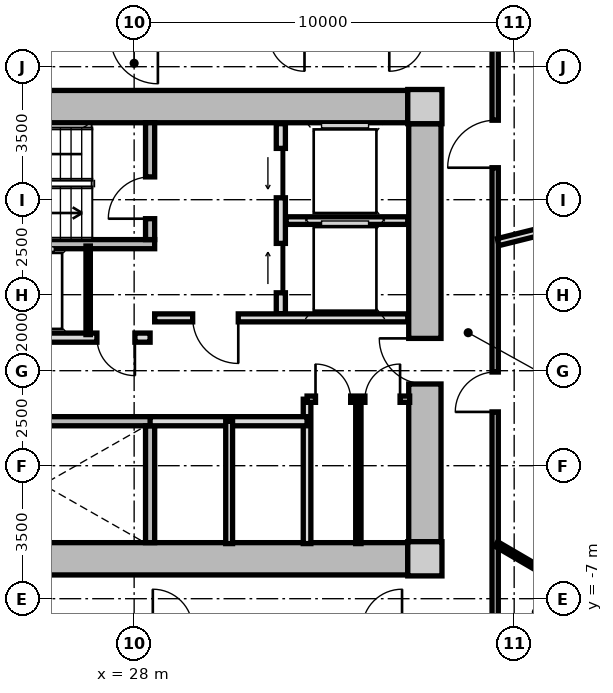
"""IFC4 building model, lengths in metres.
Left out: names, types, materials, properties, quantities, classifications, styles, units other than length and angle.
Written with IfcOpenShell. Run it as: python <this file> out.ifc"""

import sys

from ifc_helpers import new_model, si_unit, direction, frame, frame_2d, origin, origin_2d, place, context, subcontext, project, spatial, rectangle, extrude, source, transform, mapped, element, fill, save


model = new_model("IFC4")
c1 = context("Model", 3, precision=1e-05, world=origin(), true_north=direction((0.0, 1.0)))
c2 = subcontext(c1, "Body", "Model", "MODEL_VIEW")
j1 = project(units=[si_unit("LENGTHUNIT", "METRE"), si_unit("PLANEANGLEUNIT", "RADIAN")], contexts=[c1])
p1 = place(None, origin())
s1 = spatial("IfcSite", under=j1, at=p1, CompositionType="ELEMENT")
p2 = place(p1, origin())
s2 = spatial("IfcBuilding", under=s1, at=p2, CompositionType="ELEMENT")
p3 = place(p2, frame((0.0, 0.0, 49.05)))
s3 = spatial("IfcBuildingStorey", under=s2, at=p3, CompositionType="ELEMENT", Elevation=49.05)
m1 = source(origin(), c2, "Body", "SweptSolid", [
    extrude(rectangle(XDim=0.9, YDim=0.9, at=origin_2d()), origin(), (0.0, 0.0, 1.0), 3.05),
])
for number, where, z_axis, x_axis in (
    (1, (35.65, -5.95, 0.0), (0.0, 0.0, 1.0), (1.0, 0.0, 0.0)),
    (2, (35.65, 5.95, 0.0), (0.0, 0.0, 1.0), (1.0, 0.0, 0.0)),
):
    element("IfcColumn", number, at=place(p3, frame(where, z_axis=z_axis, x_axis=x_axis)), inside=s3, PredefinedType="COLUMN", context=c2, shape_type="MappedRepresentation", body=[
        mapped(m1, transform((0.0, 0.0, 0.0), x_axis=(1.0, 0.0, 0.0), y_axis=(0.0, 1.0, 0.0), z_axis=(0.0, 0.0, 1.0), scale=1.0)),
    ])
m2 = source(origin(), c2, "Body", "SweptSolid", [
    extrude(rectangle(XDim=14.4, YDim=0.85, at=frame_2d((7.2, 0.0))), origin(), (0.0, 0.0, 1.0), 2.79),
])
for number, where, z_axis, x_axis in (
    (3, (20.8, 5.95, 0.0), (0.0, 0.0, 1.0), (1.0, 0.0, 0.0)),
    (4, (35.2, -5.95, 0.0), (0.0, 0.0, 1.0), (-1.0, 0.0, 0.0)),
):
    element("IfcWall", number, at=place(p3, frame(where, z_axis=z_axis, x_axis=x_axis)), inside=s3, PredefinedType="SHEAR", context=c2, shape_type="MappedRepresentation", body=[
        mapped(m2, transform((0.0, 0.0, 0.0), x_axis=(1.0, 0.0, 0.0), y_axis=(0.0, 1.0, 0.0), z_axis=(0.0, 0.0, 1.0), scale=1.0)),
    ])
m3 = source(origin(), c2, "Body", "SweptSolid", [
    extrude(rectangle(XDim=11.0, YDim=0.85, at=frame_2d((5.5, 0.0))), origin(), (0.0, 0.0, 1.0), 2.79),
])
p4 = place(p3, frame((35.65, 5.5, 0.0), z_axis=(0.0, 0.0, 1.0), x_axis=(0.0, -1.0, 0.0)))
e5 = element("IfcWall", 5, at=p4, inside=s3, PredefinedType="SHEAR", context=c2, shape_type="MappedRepresentation", body=[
    mapped(m3, transform((0.0, 0.0, 0.0), x_axis=(1.0, 0.0, 0.0), y_axis=(0.0, 1.0, 0.0), z_axis=(0.0, 0.0, 1.0), scale=1.0)),
])
p5 = place(p4, frame((5.65, 0.0, 0.0)))
e6 = element("IfcOpeningElement", 6, at=p5, cuts=e5, PredefinedType="OPENING", context=c2, shape_type="SweptSolid", body=[
    extrude(rectangle(XDim=1.2, YDim=2.15, at=frame_2d((0.6, 1.075))), frame((0.0, 0.435, 0.0), z_axis=(0.0, -1.0, 0.0), x_axis=(1.0, 0.0, 0.0)), (0.0, 0.0, 1.0), 0.87),
])
m4 = source(origin(), c2, "Body", "SweptSolid", [
    extrude(rectangle(XDim=7.765, YDim=0.24, at=frame_2d((3.883, 0.0))), origin(), (0.0, 0.0, 1.0), 2.79),
])
p6 = place(p3, frame((20.775, 2.33, 0.0), z_axis=(0.0, 0.0, 1.0), x_axis=(1.0, 0.0, 0.0)))
e7 = element("IfcWall", 7, at=p6, inside=s3, PredefinedType="PARTITIONING", context=c2, shape_type="MappedRepresentation", body=[
    mapped(m4, transform((0.0, 0.0, 0.0), x_axis=(1.0, 0.0, 0.0), y_axis=(0.0, 1.0, 0.0), z_axis=(0.0, 0.0, 1.0), scale=1.0)),
])
m5 = source(origin(), c2, "Body", "SweptSolid", [
    extrude(rectangle(XDim=3.075, YDim=0.24, at=frame_2d((1.538, 0.0))), origin(), (0.0, 0.0, 1.0), 2.79),
])
p7 = place(p3, frame((28.42, 2.45, 0.0), z_axis=(0.0, 0.0, 1.0), x_axis=(0.0, 1.0, 0.0)))
e8 = element("IfcWall", 8, at=p7, inside=s3, PredefinedType="PARTITIONING", context=c2, shape_type="MappedRepresentation", body=[
    mapped(m5, transform((0.0, 0.0, 0.0), x_axis=(1.0, 0.0, 0.0), y_axis=(0.0, 1.0, 0.0), z_axis=(0.0, 0.0, 1.0), scale=1.0)),
])
p8 = place(p7, frame((0.55, 0.0, 0.0)))
e9 = element("IfcOpeningElement", 9, at=p8, cuts=e8, PredefinedType="OPENING", context=c2, shape_type="SweptSolid", body=[
    extrude(rectangle(XDim=1.1, YDim=2.15, at=frame_2d((0.55, 1.075))), frame((0.0, 0.13, 0.0), z_axis=(0.0, -1.0, 0.0), x_axis=(1.0, 0.0, 0.0)), (0.0, 0.0, 1.0), 0.26),
])
p9 = place(p3, frame((20.775, -2.33, 0.0), z_axis=(0.0, 0.0, 1.0), x_axis=(1.0, 0.0, 0.0)))
e10 = element("IfcWall", 10, at=p9, inside=s3, PredefinedType="PARTITIONING", context=c2, shape_type="MappedRepresentation", body=[
    mapped(m4, transform((0.0, 0.0, 0.0), x_axis=(1.0, 0.0, 0.0), y_axis=(0.0, 1.0, 0.0), z_axis=(0.0, 0.0, 1.0), scale=1.0)),
])
p10 = place(p9, frame((0.885, 0.0, 0.0)))
e11 = element("IfcOpeningElement", 11, at=p10, cuts=e10, PredefinedType="OPENING", context=c2, shape_type="SweptSolid", body=[
    extrude(rectangle(XDim=1.1, YDim=2.15, at=frame_2d((0.55, 1.075))), frame((0.0, 0.13, 0.0), z_axis=(0.0, -1.0, 0.0), x_axis=(1.0, 0.0, 0.0)), (0.0, 0.0, 1.0), 0.26),
])
p11 = place(p3, frame((28.42, -5.525, 0.0), z_axis=(0.0, 0.0, 1.0), x_axis=(0.0, 1.0, 0.0)))
e12 = element("IfcWall", 12, at=p11, inside=s3, PredefinedType="PARTITIONING", context=c2, shape_type="MappedRepresentation", body=[
    mapped(m5, transform((0.0, 0.0, 0.0), x_axis=(1.0, 0.0, 0.0), y_axis=(0.0, 1.0, 0.0), z_axis=(0.0, 0.0, 1.0), scale=1.0)),
])
m6 = source(origin(), c2, "Body", "SweptSolid", [
    extrude(rectangle(XDim=5.0, YDim=0.24, at=frame_2d((2.5, 0.0))), origin(), (0.0, 0.0, 1.0), 2.775),
])
p12 = place(p3, frame((31.86, 0.5, 0.0), z_axis=(0.0, 0.0, 1.0), x_axis=(0.0, 1.0, 0.0)))
e13 = element("IfcWall", 13, at=p12, inside=s3, PredefinedType="PARTITIONING", context=c2, shape_type="MappedRepresentation", body=[
    mapped(m6, transform((0.0, 0.0, 0.0), x_axis=(1.0, 0.0, 0.0), y_axis=(0.0, 1.0, 0.0), z_axis=(0.0, 0.0, 1.0), scale=1.0)),
])
p13 = place(p12, frame((3.05, 0.0, 0.0)))
e14 = element("IfcOpeningElement", 14, at=p13, cuts=e13, PredefinedType="OPENING", context=c2, shape_type="SweptSolid", body=[
    extrude(rectangle(XDim=1.3, YDim=2.2, at=frame_2d((0.65, 1.1))), frame((0.0, 0.13, 0.0), z_axis=(0.0, -1.0, 0.0), x_axis=(1.0, 0.0, 0.0)), (0.0, 0.0, 1.0), 0.26),
])
p14 = place(p12, frame((0.55, 0.0, 0.0)))
e15 = element("IfcOpeningElement", 15, at=p14, cuts=e13, PredefinedType="OPENING", context=c2, shape_type="SweptSolid", body=[
    extrude(rectangle(XDim=1.3, YDim=2.2, at=frame_2d((0.65, 1.1))), frame((0.0, 0.13, 0.0), z_axis=(0.0, -1.0, 0.0), x_axis=(1.0, 0.0, 0.0)), (0.0, 0.0, 1.0), 0.26),
])
m7 = source(origin(), c2, "Body", "SweptSolid", [
    extrude(rectangle(XDim=3.2, YDim=0.2, at=frame_2d((1.6, 0.0))), origin(), (0.0, 0.0, 1.0), 2.775),
])
p15 = place(p3, frame((32.0, 2.95, 0.0), z_axis=(0.0, 0.0, 1.0), x_axis=(1.0, 0.0, 0.0)))
e16 = element("IfcWall", 16, at=p15, inside=s3, PredefinedType="PARTITIONING", context=c2, shape_type="MappedRepresentation", body=[
    mapped(m7, transform((0.0, 0.0, 0.0), x_axis=(1.0, 0.0, 0.0), y_axis=(0.0, 1.0, 0.0), z_axis=(0.0, 0.0, 1.0), scale=1.0)),
])
m8 = source(origin(), c2, "Body", "SweptSolid", [
    extrude(rectangle(XDim=6.66, YDim=0.21, at=frame_2d((3.33, 0.0))), origin(), (0.0, 0.0, 1.0), 2.775),
])
p16 = place(p3, frame((28.54, 0.39, 0.0), z_axis=(0.0, 0.0, 1.0), x_axis=(1.0, 0.0, 0.0)))
e17 = element("IfcWall", 17, at=p16, inside=s3, PredefinedType="PARTITIONING", context=c2, shape_type="MappedRepresentation", body=[
    mapped(m8, transform((0.0, 0.0, 0.0), x_axis=(1.0, 0.0, 0.0), y_axis=(0.0, 1.0, 0.0), z_axis=(0.0, 0.0, 1.0), scale=1.0)),
])
p17 = place(p16, frame((1.0, 0.0, 0.0)))
e18 = element("IfcOpeningElement", 18, at=p17, cuts=e17, PredefinedType="OPENING", context=c2, shape_type="SweptSolid", body=[
    extrude(rectangle(XDim=1.2, YDim=2.15, at=frame_2d((0.6, 1.075))), frame((0.0, 0.115, 0.0), z_axis=(0.0, -1.0, 0.0), x_axis=(1.0, 0.0, 0.0)), (0.0, 0.0, 1.0), 0.23),
])
m9 = source(origin(), c2, "Body", "SweptSolid", [
    extrude(rectangle(XDim=7.62, YDim=0.24, at=frame_2d((3.81, 0.0))), origin(), (0.0, 0.0, 1.0), 2.775),
])
p18 = place(p3, frame((20.8, -0.13, 0.0), z_axis=(0.0, 0.0, 1.0), x_axis=(1.0, 0.0, 0.0)))
e19 = element("IfcWall", 19, at=p18, inside=s3, PredefinedType="PARTITIONING", context=c2, shape_type="MappedRepresentation", body=[
    mapped(m9, transform((0.0, 0.0, 0.0), x_axis=(1.0, 0.0, 0.0), y_axis=(0.0, 1.0, 0.0), z_axis=(0.0, 0.0, 1.0), scale=1.0)),
])
p19 = place(p18, frame((6.22, 0.0, 0.0)))
e20 = element("IfcOpeningElement", 20, at=p19, cuts=e19, PredefinedType="OPENING", context=c2, shape_type="SweptSolid", body=[
    extrude(rectangle(XDim=1.0, YDim=2.1, at=frame_2d((0.5, 1.05))), frame((0.0, 0.13, 0.0), z_axis=(0.0, -1.0, 0.0), x_axis=(1.0, 0.0, 0.0)), (0.0, 0.0, 1.0), 0.26),
])
p20 = place(p18, frame((0.85, 0.0, 0.0)))
e21 = element("IfcOpeningElement", 21, at=p20, cuts=e19, PredefinedType="OPENING", context=c2, shape_type="SweptSolid", body=[
    extrude(rectangle(XDim=1.1, YDim=2.2, at=frame_2d((0.55, 1.1))), frame((0.0, 0.13, 0.0), z_axis=(0.0, -1.0, 0.0), x_axis=(1.0, 0.0, 0.0)), (0.0, 0.0, 1.0), 0.26),
])
p21 = place(p18, frame((3.85, 0.0, 0.0)))
e22 = element("IfcOpeningElement", 22, at=p21, cuts=e19, PredefinedType="OPENING", context=c2, shape_type="SweptSolid", body=[
    extrude(rectangle(XDim=1.1, YDim=2.2, at=frame_2d((0.55, 1.1))), frame((0.0, 0.13, 0.0), z_axis=(0.0, -1.0, 0.0), x_axis=(1.0, 0.0, 0.0)), (0.0, 0.0, 1.0), 0.26),
])
m10 = source(origin(), c2, "Body", "SweptSolid", [
    extrude(rectangle(XDim=2.33, YDim=0.115, at=frame_2d((1.165, 0.0))), origin(), (0.0, 0.0, 1.0), 2.775),
])
p22 = place(p3, frame((26.79, -0.05, 0.0), z_axis=(0.0, 0.0, 1.0), x_axis=(0.0, 1.0, 0.0)))
e23 = element("IfcWall", 23, at=p22, inside=s3, PredefinedType="PARTITIONING", context=c2, shape_type="MappedRepresentation", body=[
    mapped(m10, transform((0.0, 0.0, 0.0), x_axis=(1.0, 0.0, 0.0), y_axis=(0.0, 1.0, 0.0), z_axis=(0.0, 0.0, 1.0), scale=1.0)),
])
m11 = source(origin(), c2, "Body", "SweptSolid", [
    extrude(rectangle(XDim=3.8, YDim=0.2, at=frame_2d((1.9, 0.0))), origin(), (0.0, 0.0, 1.0), 2.775),
])
p23 = place(p3, frame((32.55, -5.55, 0.0), z_axis=(0.0, 0.0, 1.0), x_axis=(0.0, 1.0, 0.0)))
e24 = element("IfcWall", 24, at=p23, inside=s3, PredefinedType="PARTITIONING", context=c2, shape_type="MappedRepresentation", body=[
    mapped(m11, transform((0.0, 0.0, 0.0), x_axis=(1.0, 0.0, 0.0), y_axis=(0.0, 1.0, 0.0), z_axis=(0.0, 0.0, 1.0), scale=1.0)),
])
m12 = source(origin(), c2, "Body", "SweptSolid", [
    extrude(rectangle(XDim=4.13, YDim=0.24, at=frame_2d((2.065, 0.0))), origin(), (0.0, 0.0, 1.0), 2.775),
])
p24 = place(p3, frame((28.42, -2.33, 0.0), z_axis=(0.0, 0.0, 1.0), x_axis=(1.0, 0.0, 0.0)))
e25 = element("IfcWall", 25, at=p24, inside=s3, PredefinedType="PARTITIONING", context=c2, shape_type="MappedRepresentation", body=[
    mapped(m12, transform((0.0, 0.0, 0.0), x_axis=(1.0, 0.0, 0.0), y_axis=(0.0, 1.0, 0.0), z_axis=(0.0, 0.0, 1.0), scale=1.0)),
])
m13 = source(origin(), c2, "Body", "SweptSolid", [
    extrude(rectangle(XDim=3.22, YDim=0.18, at=frame_2d((1.61, 0.0))), origin(), (0.0, 0.0, 1.0), 2.775),
])
p25 = place(p3, frame((30.5, -5.55, 0.0), z_axis=(0.0, 0.0, 1.0), x_axis=(0.0, 1.0, 0.0)))
e26 = element("IfcWall", 26, at=p25, inside=s3, PredefinedType="PARTITIONING", context=c2, shape_type="MappedRepresentation", body=[
    mapped(m13, transform((0.0, 0.0, 0.0), x_axis=(1.0, 0.0, 0.0), y_axis=(0.0, 1.0, 0.0), z_axis=(0.0, 0.0, 1.0), scale=1.0)),
])
m14 = source(origin(), c2, "Body", "SweptSolid", [
    extrude(rectangle(XDim=2.7, YDim=0.165, at=frame_2d((1.35, 0.0))), origin(), (0.0, 0.0, 1.0), 2.775),
])
p26 = place(p3, frame((32.55, -1.75, 0.0), z_axis=(0.0, 0.0, 1.0), x_axis=(1.0, 0.0, 0.0)))
e27 = element("IfcWall", 27, at=p26, inside=s3, PredefinedType="PARTITIONING", context=c2, shape_type="MappedRepresentation", body=[
    mapped(m14, transform((0.0, 0.0, 0.0), x_axis=(1.0, 0.0, 0.0), y_axis=(0.0, 1.0, 0.0), z_axis=(0.0, 0.0, 1.0), scale=1.0)),
])
p27 = place(p26, frame((0.222, 0.0, 0.0)))
e28 = element("IfcOpeningElement", 28, at=p27, cuts=e27, PredefinedType="OPENING", context=c2, shape_type="SweptSolid", body=[
    extrude(rectangle(XDim=0.925, YDim=2.1, at=frame_2d((0.462, 1.05))), frame((0.0, 0.093, 0.0), z_axis=(0.0, -1.0, 0.0), x_axis=(1.0, 0.0, 0.0)), (0.0, 0.0, 1.0), 0.185),
])
p28 = place(p26, frame((1.522, 0.0, 0.0)))
e29 = element("IfcOpeningElement", 29, at=p28, cuts=e27, PredefinedType="OPENING", context=c2, shape_type="SweptSolid", body=[
    extrude(rectangle(XDim=0.925, YDim=2.1, at=frame_2d((0.462, 1.05))), frame((0.0, 0.093, 0.0), z_axis=(0.0, -1.0, 0.0), x_axis=(1.0, 0.0, 0.0)), (0.0, 0.0, 1.0), 0.185),
])
m15 = source(origin(), c2, "Body", "SweptSolid", [
    extrude(rectangle(XDim=3.8, YDim=0.14, at=frame_2d((1.9, 0.0))), origin(), (0.0, 0.0, 1.0), 2.775),
])
p29 = place(p3, frame((33.9, -5.55, 0.0), z_axis=(0.0, 0.0, 1.0), x_axis=(0.0, 1.0, 0.0)))
e30 = element("IfcWall", 30, at=p29, inside=s3, PredefinedType="PARTITIONING", context=c2, shape_type="MappedRepresentation", body=[
    mapped(m15, transform((0.0, 0.0, 0.0), x_axis=(1.0, 0.0, 0.0), y_axis=(0.0, 1.0, 0.0), z_axis=(0.0, 0.0, 1.0), scale=1.0)),
])
m16 = source(origin(), c2, "Body", "SweptSolid", [
    extrude(rectangle(XDim=15.6, YDim=0.165, at=frame_2d((7.8, 0.0))), origin(), (0.0, 0.0, 1.0), 2.775),
])
p30 = place(p3, frame((37.5, 7.8, 0.0), z_axis=(0.0, 0.0, 1.0), x_axis=(0.0, -1.0, 0.0)))
e31 = element("IfcWall", 31, at=p30, inside=s3, PredefinedType="PARTITIONING", context=c2, shape_type="MappedRepresentation", body=[
    mapped(m16, transform((0.0, 0.0, 0.0), x_axis=(1.0, 0.0, 0.0), y_axis=(0.0, 1.0, 0.0), z_axis=(0.0, 0.0, 1.0), scale=1.0)),
])
p31 = place(p30, frame((8.835, 0.0, 0.0)))
e32 = element("IfcOpeningElement", 32, at=p31, cuts=e31, PredefinedType="OPENING", context=c2, shape_type="SweptSolid", body=[
    extrude(rectangle(XDim=1.05, YDim=2.15, at=frame_2d((0.525, 1.075))), frame((0.0, 0.093, 0.0), z_axis=(0.0, -1.0, 0.0), x_axis=(1.0, 0.0, 0.0)), (0.0, 0.0, 1.0), 0.185),
])
p32 = place(p30, frame((2.208, 0.0, 0.0)))
e33 = element("IfcOpeningElement", 33, at=p32, cuts=e31, PredefinedType="OPENING", context=c2, shape_type="SweptSolid", body=[
    extrude(rectangle(XDim=1.25, YDim=2.2, at=frame_2d((0.625, 1.1))), frame((0.0, 0.093, 0.0), z_axis=(0.0, -1.0, 0.0), x_axis=(1.0, 0.0, 0.0)), (0.0, 0.0, 1.0), 0.185),
])
m17 = source(origin(), c2, "Body", "SweptSolid", [
    extrude(rectangle(XDim=9.737, YDim=0.19, at=frame_2d((4.869, 0.0))), origin(), (0.0, 0.0, 1.0), 2.225),
])
p33 = place(p3, frame((37.58, 2.385, 0.0), z_axis=(0.0, 0.0, 1.0), x_axis=(0.970392716238, 0.241532557375, 0.0)))
e34 = element("IfcWall", 34, at=p33, inside=s3, PredefinedType="PARTITIONING", context=c2, shape_type="MappedRepresentation", body=[
    mapped(m17, transform((0.0, 0.0, 0.0), x_axis=(1.0, 0.0, 0.0), y_axis=(0.0, 1.0, 0.0), z_axis=(0.0, 0.0, 1.0), scale=1.0)),
])
m18 = source(origin(), c2, "Body", "SweptSolid", [
    extrude(rectangle(XDim=2.669, YDim=0.14, at=frame_2d((1.335, 0.0))), origin(), (0.0, 0.0, 1.0), 2.775),
])
p34 = place(p3, frame((37.53, -5.561, 0.0), z_axis=(0.0, 0.0, 1.0), x_axis=(0.86369928178, -0.50400749067, 0.0)))
e35 = element("IfcWall", 35, at=p34, inside=s3, PredefinedType="PARTITIONING", context=c2, shape_type="MappedRepresentation", body=[
    mapped(m18, transform((0.0, 0.0, 0.0), x_axis=(1.0, 0.0, 0.0), y_axis=(0.0, 1.0, 0.0), z_axis=(0.0, 0.0, 1.0), scale=1.0)),
])
m19 = source(origin(), c2, "Body", "SweptSolid", [
    extrude(rectangle(XDim=3.121, YDim=0.14, at=frame_2d((1.561, 0.0))), origin(), (0.0, 0.0, 1.0), 2.775),
])
p35 = place(p3, frame((39.836, -6.906, 0.0), z_axis=(0.0, 0.0, 1.0), x_axis=(-0.487302357327, -0.873233309342, 0.0)))
e36 = element("IfcWall", 36, at=p35, inside=s3, PredefinedType="PARTITIONING", context=c2, shape_type="MappedRepresentation", body=[
    mapped(m19, transform((0.0, 0.0, 0.0), x_axis=(1.0, 0.0, 0.0), y_axis=(0.0, 1.0, 0.0), z_axis=(0.0, 0.0, 1.0), scale=1.0)),
])
p36 = place(p35, frame((1.101, 0.0, 0.0)))
e37 = element("IfcOpeningElement", 37, at=p36, cuts=e36, PredefinedType="OPENING", context=c2, shape_type="SweptSolid", body=[
    extrude(rectangle(XDim=0.92, YDim=2.1, at=frame_2d((0.46, 1.05))), frame((0.0, 0.08, 0.0), z_axis=(0.0, -1.0, 0.0), x_axis=(1.0, 0.0, 0.0)), (0.0, 0.0, 1.0), 0.16),
])
m20 = source(origin(), c2, "Body", "SweptSolid", [
    extrude(rectangle(XDim=1.1, YDim=2.15, at=frame_2d((0.55, 1.075))), frame((0.0, 0.025, 0.0), z_axis=(0.0, -1.0, 0.0), x_axis=(1.0, 0.0, 0.0)), (0.0, 0.0, 1.0), 0.05),
])
p37 = place(p8, origin())
e38 = element("IfcDoor", 38, at=p37, inside=s3, OperationType="SINGLE_SWING_LEFT", PredefinedType="DOOR", context=c2, shape_type="MappedRepresentation", body=[
    mapped(m20, transform((0.0, 0.0, 0.0), x_axis=(1.0, 0.0, 0.0), y_axis=(0.0, 1.0, 0.0), z_axis=(0.0, 0.0, 1.0), scale=1.0)),
])
fill(e9, e38)
m21 = source(origin(), c2, "Body", "SweptSolid", [
    extrude(rectangle(XDim=1.3, YDim=2.2, at=frame_2d((0.65, 1.1))), frame((0.0, 0.025, 0.0), z_axis=(0.0, -1.0, 0.0), x_axis=(1.0, 0.0, 0.0)), (0.0, 0.0, 1.0), 0.05),
])
p38 = place(p13, origin())
e39 = element("IfcDoor", 39, at=p38, inside=s3, OperationType="SLIDING_TO_LEFT", PredefinedType="DOOR", context=c2, shape_type="MappedRepresentation", body=[
    mapped(m21, transform((0.0, 0.0, 0.0), x_axis=(1.0, 0.0, 0.0), y_axis=(0.0, 1.0, 0.0), z_axis=(0.0, 0.0, 1.0), scale=1.0)),
])
fill(e14, e39)
p39 = place(p14, origin())
e40 = element("IfcDoor", 40, at=p39, inside=s3, OperationType="SLIDING_TO_RIGHT", PredefinedType="DOOR", context=c2, shape_type="MappedRepresentation", body=[
    mapped(m21, transform((0.0, 0.0, 0.0), x_axis=(1.0, 0.0, 0.0), y_axis=(0.0, 1.0, 0.0), z_axis=(0.0, 0.0, 1.0), scale=1.0)),
])
fill(e15, e40)
m22 = source(origin(), c2, "Body", "SweptSolid", [
    extrude(rectangle(XDim=1.2, YDim=2.15, at=frame_2d((0.6, 1.075))), frame((0.0, 0.025, 0.0), z_axis=(0.0, -1.0, 0.0), x_axis=(1.0, 0.0, 0.0)), (0.0, 0.0, 1.0), 0.05),
])
p40 = place(p17, frame((1.2, 0.0, 0.0), z_axis=(0.0, 0.0, 1.0), x_axis=(-1.0, 0.0, 0.0)))
e41 = element("IfcDoor", 41, at=p40, inside=s3, OperationType="SINGLE_SWING_LEFT", PredefinedType="DOOR", context=c2, shape_type="MappedRepresentation", body=[
    mapped(m22, transform((0.0, 0.0, 0.0), x_axis=(1.0, 0.0, 0.0), y_axis=(0.0, 1.0, 0.0), z_axis=(0.0, 0.0, 1.0), scale=1.0)),
])
fill(e18, e41)
p41 = place(p5, frame((1.2, 0.0, 0.0), z_axis=(0.0, 0.0, 1.0), x_axis=(-1.0, 0.0, 0.0)))
e42 = element("IfcDoor", 42, at=p41, inside=s3, OperationType="SINGLE_SWING_RIGHT", PredefinedType="DOOR", context=c2, shape_type="MappedRepresentation", body=[
    mapped(m22, transform((0.0, 0.0, 0.0), x_axis=(1.0, 0.0, 0.0), y_axis=(0.0, 1.0, 0.0), z_axis=(0.0, 0.0, 1.0), scale=1.0)),
])
fill(e6, e42)
m23 = source(origin(), c2, "Body", "SweptSolid", [
    extrude(rectangle(XDim=1.0, YDim=2.1, at=frame_2d((0.5, 1.05))), frame((0.0, 0.025, 0.0), z_axis=(0.0, -1.0, 0.0), x_axis=(1.0, 0.0, 0.0)), (0.0, 0.0, 1.0), 0.05),
])
p42 = place(p19, frame((1.0, 0.0, 0.0), z_axis=(0.0, 0.0, 1.0), x_axis=(-1.0, 0.0, 0.0)))
e43 = element("IfcDoor", 43, at=p42, inside=s3, OperationType="SINGLE_SWING_LEFT", PredefinedType="DOOR", context=c2, shape_type="MappedRepresentation", body=[
    mapped(m23, transform((0.0, 0.0, 0.0), x_axis=(1.0, 0.0, 0.0), y_axis=(0.0, 1.0, 0.0), z_axis=(0.0, 0.0, 1.0), scale=1.0)),
])
fill(e20, e43)
m24 = source(origin(), c2, "Body", "SweptSolid", [
    extrude(rectangle(XDim=0.925, YDim=2.1, at=frame_2d((0.462, 1.05))), frame((0.0, 0.025, 0.0), z_axis=(0.0, -1.0, 0.0), x_axis=(1.0, 0.0, 0.0)), (0.0, 0.0, 1.0), 0.05),
])
p43 = place(p27, origin())
e44 = element("IfcDoor", 44, at=p43, inside=s3, OperationType="SINGLE_SWING_LEFT", PredefinedType="DOOR", context=c2, shape_type="MappedRepresentation", body=[
    mapped(m24, transform((0.0, 0.0, 0.0), x_axis=(1.0, 0.0, 0.0), y_axis=(0.0, 1.0, 0.0), z_axis=(0.0, 0.0, 1.0), scale=1.0)),
])
fill(e28, e44)
p44 = place(p28, origin())
e45 = element("IfcDoor", 45, at=p44, inside=s3, OperationType="SINGLE_SWING_RIGHT", PredefinedType="DOOR", context=c2, shape_type="MappedRepresentation", body=[
    mapped(m24, transform((0.0, 0.0, 0.0), x_axis=(1.0, 0.0, 0.0), y_axis=(0.0, 1.0, 0.0), z_axis=(0.0, 0.0, 1.0), scale=1.0)),
])
fill(e29, e45)
m25 = source(origin(), c2, "Body", "SweptSolid", [
    extrude(rectangle(XDim=1.05, YDim=2.15, at=frame_2d((0.525, 1.075))), frame((0.0, 0.025, 0.0), z_axis=(0.0, -1.0, 0.0), x_axis=(1.0, 0.0, 0.0)), (0.0, 0.0, 1.0), 0.05),
])
p45 = place(p31, frame((1.05, 0.0, 0.0), z_axis=(0.0, 0.0, 1.0), x_axis=(-1.0, 0.0, 0.0)))
e46 = element("IfcDoor", 46, at=p45, inside=s3, OperationType="SINGLE_SWING_LEFT", PredefinedType="DOOR", context=c2, shape_type="MappedRepresentation", body=[
    mapped(m25, transform((0.0, 0.0, 0.0), x_axis=(1.0, 0.0, 0.0), y_axis=(0.0, 1.0, 0.0), z_axis=(0.0, 0.0, 1.0), scale=1.0)),
])
fill(e32, e46)
m26 = source(origin(), c2, "Body", "SweptSolid", [
    extrude(rectangle(XDim=1.25, YDim=2.2, at=frame_2d((0.625, 1.1))), frame((0.0, 0.025, 0.0), z_axis=(0.0, -1.0, 0.0), x_axis=(1.0, 0.0, 0.0)), (0.0, 0.0, 1.0), 0.05),
])
p46 = place(p32, frame((1.25, 0.0, 0.0), z_axis=(0.0, 0.0, 1.0), x_axis=(-1.0, 0.0, 0.0)))
e47 = element("IfcDoor", 47, at=p46, inside=s3, OperationType="SINGLE_SWING_LEFT", PredefinedType="DOOR", context=c2, shape_type="MappedRepresentation", body=[
    mapped(m26, transform((0.0, 0.0, 0.0), x_axis=(1.0, 0.0, 0.0), y_axis=(0.0, 1.0, 0.0), z_axis=(0.0, 0.0, 1.0), scale=1.0)),
])
fill(e33, e47)
save(model, sys.argv[1])
